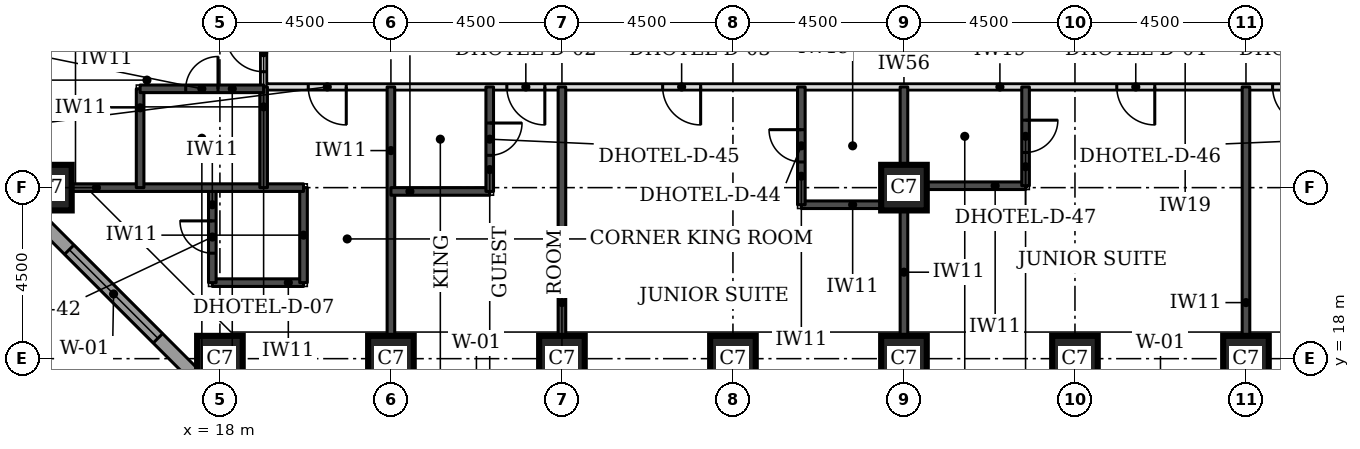
"""IFC4 building model, lengths in metres.
Left out: names, types, materials, properties, quantities, classifications, styles, units other than length and angle.
Written with IfcOpenShell. Run it as: python <this file> out.ifc"""

import sys

from ifc_helpers import new_model, si_unit, direction, frame, frame_2d, origin, origin_2d, place, context, subcontext, project, spatial, rectangle, extrude, element, fill, save


model = new_model("IFC4")
c1 = context("Model", 3, precision=1e-05, world=origin(), true_north=direction((0.0, 1.0)))
c2 = subcontext(c1, "Body", "Model", "MODEL_VIEW")
j1 = project(units=[si_unit("LENGTHUNIT", "METRE"), si_unit("PLANEANGLEUNIT", "RADIAN")], contexts=[c1])
p1 = place(None, origin())
s1 = spatial("IfcSite", under=j1, at=p1, CompositionType="ELEMENT")
p2 = place(p1, origin())
s2 = spatial("IfcBuilding", under=s1, at=p2, CompositionType="ELEMENT")
p3 = place(p2, frame((0.0, 0.0, 36.3)))
s3 = spatial("IfcBuildingStorey", under=s2, at=p3, CompositionType="ELEMENT", Elevation=36.3)
for number, where, z_axis, x_axis in (
    (1, (18.0, 18.0, 0.0), (0.0, 0.0, 1.0), (1.0, 0.0, 0.0)),
    (2, (22.5, 18.0, 0.0), (0.0, 0.0, 1.0), (1.0, 0.0, 0.0)),
    (3, (27.0, 18.0, 0.0), (0.0, 0.0, 1.0), (1.0, 0.0, 0.0)),
    (4, (31.5, 18.0, 0.0), (0.0, 0.0, 1.0), (1.0, 0.0, 0.0)),
    (5, (36.0, 18.0, 0.0), (0.0, 0.0, 1.0), (1.0, 0.0, 0.0)),
    (6, (40.5, 18.0, 0.0), (0.0, 0.0, 1.0), (1.0, 0.0, 0.0)),
    (7, (45.0, 18.0, 0.0), (0.0, 0.0, 1.0), (1.0, 0.0, 0.0)),
    (8, (13.5, 22.5, 0.0), (0.0, 0.0, 1.0), (1.0, 0.0, 0.0)),
    (9, (36.0, 22.5, 0.0), (0.0, 0.0, 1.0), (1.0, 0.0, 0.0)),
):
    element("IfcColumn", number, at=place(p3, frame(where, z_axis=z_axis, x_axis=x_axis)), inside=s3, PredefinedType="COLUMN", context=c2, shape_type="SweptSolid", body=[
        extrude(rectangle(XDim=1.2, YDim=1.2, at=origin_2d()), origin(), (0.0, 0.0, 1.0), 3.3),
    ])
p4 = place(p3, frame((12.674, 22.23, 0.0), z_axis=(0.0, 0.0, 1.0), x_axis=(0.707106781187, -0.707106781187, 0.0)))
e10 = element("IfcWall", 10, at=p4, inside=s3, PredefinedType="STANDARD", context=c2, shape_type="SweptSolid", body=[
    extrude(rectangle(XDim=7.151, YDim=0.35, at=frame_2d((3.576, 0.0))), origin(), (0.0, 0.0, 1.0), 3.055),
])
p5 = place(p4, frame((1.926, 0.0, 0.8)))
e11 = element("IfcOpeningElement", 11, at=p5, cuts=e10, PredefinedType="OPENING", context=c2, shape_type="SweptSolid", body=[
    extrude(rectangle(XDim=3.3, YDim=1.5, at=frame_2d((1.65, 0.75))), frame((0.0, 0.185, 0.0), z_axis=(0.0, -1.0, 0.0), x_axis=(1.0, 0.0, 0.0)), (0.0, 0.0, 1.0), 0.37),
])
p6 = place(p3, frame((19.15, 25.15, 0.0), z_axis=(0.0, 0.0, 1.0), x_axis=(1.0, 0.0, 0.0)))
e12 = element("IfcWall", 12, at=p6, inside=s3, PredefinedType="PARTITIONING", context=c2, shape_type="SweptSolid", body=[
    extrude(rectangle(XDim=32.35, YDim=0.15, at=frame_2d((16.175, 0.0))), origin(), (0.0, 0.0, 1.0), 3.08),
])
p7 = place(p6, frame((6.4, 0.0, 0.0)))
e13 = element("IfcOpeningElement", 13, at=p7, cuts=e12, PredefinedType="OPENING", context=c2, shape_type="SweptSolid", body=[
    extrude(rectangle(XDim=1.0, YDim=2.1, at=frame_2d((0.5, 1.05))), frame((0.0, 0.085, 0.0), z_axis=(0.0, -1.0, 0.0), x_axis=(1.0, 0.0, 0.0)), (0.0, 0.0, 1.0), 0.17),
])
p8 = place(p6, frame((10.5, 0.0, 0.0)))
e14 = element("IfcOpeningElement", 14, at=p8, cuts=e12, PredefinedType="OPENING", context=c2, shape_type="SweptSolid", body=[
    extrude(rectangle(XDim=1.0, YDim=2.1, at=frame_2d((0.5, 1.05))), frame((0.0, 0.085, 0.0), z_axis=(0.0, -1.0, 0.0), x_axis=(1.0, 0.0, 0.0)), (0.0, 0.0, 1.0), 0.17),
])
p9 = place(p6, frame((22.45, 0.0, 0.0)))
e15 = element("IfcOpeningElement", 15, at=p9, cuts=e12, PredefinedType="OPENING", context=c2, shape_type="SweptSolid", body=[
    extrude(rectangle(XDim=1.0, YDim=2.1, at=frame_2d((0.5, 1.05))), frame((0.0, 0.085, 0.0), z_axis=(0.0, -1.0, 0.0), x_axis=(1.0, 0.0, 0.0)), (0.0, 0.0, 1.0), 0.17),
])
p10 = place(p6, frame((26.55, 0.0, 0.0)))
e16 = element("IfcOpeningElement", 16, at=p10, cuts=e12, PredefinedType="OPENING", context=c2, shape_type="SweptSolid", body=[
    extrude(rectangle(XDim=1.0, YDim=2.1, at=frame_2d((0.5, 1.05))), frame((0.0, 0.085, 0.0), z_axis=(0.0, -1.0, 0.0), x_axis=(1.0, 0.0, 0.0)), (0.0, 0.0, 1.0), 0.17),
])
p11 = place(p6, frame((1.175, 0.0, 0.0)))
e17 = element("IfcOpeningElement", 17, at=p11, cuts=e12, PredefinedType="OPENING", context=c2, shape_type="SweptSolid", body=[
    extrude(rectangle(XDim=1.0, YDim=2.1, at=frame_2d((0.5, 1.05))), frame((0.0, 0.085, 0.0), z_axis=(0.0, -1.0, 0.0), x_axis=(1.0, 0.0, 0.0)), (0.0, 0.0, 1.0), 0.17),
])
p12 = place(p6, frame((30.85, 0.0, 0.0)))
e18 = element("IfcOpeningElement", 18, at=p12, cuts=e12, PredefinedType="OPENING", context=c2, shape_type="SweptSolid", body=[
    extrude(rectangle(XDim=1.0, YDim=2.1, at=frame_2d((0.5, 1.05))), frame((0.0, 0.085, 0.0), z_axis=(0.0, -1.0, 0.0), x_axis=(1.0, 0.0, 0.0)), (0.0, 0.0, 1.0), 0.17),
])
p13 = place(p3, frame((19.15, 25.15, 0.0), z_axis=(0.0, 0.0, 1.0), x_axis=(0.0, 1.0, 0.0)))
e19 = element("IfcWall", 19, at=p13, inside=s3, PredefinedType="PARTITIONING", context=c2, shape_type="SweptSolid", body=[
    extrude(rectangle(XDim=24.35, YDim=0.15, at=frame_2d((12.175, 0.0))), origin(), (0.0, 0.0, 1.0), 3.08),
])
p14 = place(p13, frame((0.4, 0.0, 0.0)))
e20 = element("IfcOpeningElement", 20, at=p14, cuts=e19, PredefinedType="OPENING", context=c2, shape_type="SweptSolid", body=[
    extrude(rectangle(XDim=1.0, YDim=2.1, at=frame_2d((0.5, 1.05))), frame((0.0, 0.085, 0.0), z_axis=(0.0, -1.0, 0.0), x_axis=(1.0, 0.0, 0.0)), (0.0, 0.0, 1.0), 0.17),
])
p15 = place(p13, frame((2.55, 0.0, 0.0)))
e21 = element("IfcOpeningElement", 21, at=p15, cuts=e19, PredefinedType="OPENING", context=c2, shape_type="SweptSolid", body=[
    extrude(rectangle(XDim=1.0, YDim=2.1, at=frame_2d((0.5, 1.05))), frame((0.0, 0.085, 0.0), z_axis=(0.0, -1.0, 0.0), x_axis=(1.0, 0.0, 0.0)), (0.0, 0.0, 1.0), 0.17),
])
p16 = place(p13, frame((9.4, 0.0, 0.0)))
e22 = element("IfcOpeningElement", 22, at=p16, cuts=e19, PredefinedType="OPENING", context=c2, shape_type="SweptSolid", body=[
    extrude(rectangle(XDim=1.0, YDim=2.1, at=frame_2d((0.5, 1.05))), frame((0.0, 0.085, 0.0), z_axis=(0.0, -1.0, 0.0), x_axis=(1.0, 0.0, 0.0)), (0.0, 0.0, 1.0), 0.17),
])
p17 = place(p13, frame((11.55, 0.0, 0.0)))
e23 = element("IfcOpeningElement", 23, at=p17, cuts=e19, PredefinedType="OPENING", context=c2, shape_type="SweptSolid", body=[
    extrude(rectangle(XDim=1.0, YDim=2.1, at=frame_2d((0.5, 1.05))), frame((0.0, 0.085, 0.0), z_axis=(0.0, -1.0, 0.0), x_axis=(1.0, 0.0, 0.0)), (0.0, 0.0, 1.0), 0.17),
])
p18 = place(p13, frame((18.4, 0.0, 0.0)))
e24 = element("IfcOpeningElement", 24, at=p18, cuts=e19, PredefinedType="OPENING", context=c2, shape_type="SweptSolid", body=[
    extrude(rectangle(XDim=1.0, YDim=2.1, at=frame_2d((0.5, 1.05))), frame((0.0, 0.085, 0.0), z_axis=(0.0, -1.0, 0.0), x_axis=(1.0, 0.0, 0.0)), (0.0, 0.0, 1.0), 0.17),
])
p19 = place(p13, frame((20.55, 0.0, 0.0)))
e25 = element("IfcOpeningElement", 25, at=p19, cuts=e19, PredefinedType="OPENING", context=c2, shape_type="SweptSolid", body=[
    extrude(rectangle(XDim=1.0, YDim=2.1, at=frame_2d((0.5, 1.05))), frame((0.0, 0.085, 0.0), z_axis=(0.0, -1.0, 0.0), x_axis=(1.0, 0.0, 0.0)), (0.0, 0.0, 1.0), 0.17),
])
for number, where, z_axis, x_axis in (
    (26, (22.5, 18.6, 0.0), (0.0, 0.0, 1.0), (0.0, 1.0, 0.0)),
    (27, (27.0, 18.6, 0.0), (0.0, 0.0, 1.0), (0.0, 1.0, 0.0)),
    (28, (36.0, 18.6, 0.0), (0.0, 0.0, 1.0), (0.0, 1.0, 0.0)),
    (29, (45.0, 18.6, 0.0), (0.0, 0.0, 1.0), (0.0, 1.0, 0.0)),
):
    element("IfcWall", number, at=place(p3, frame(where, z_axis=z_axis, x_axis=x_axis)), inside=s3, PredefinedType="SOLIDWALL", context=c2, shape_type="SweptSolid", body=[
        extrude(rectangle(XDim=6.55, YDim=0.2, at=frame_2d((3.275, 0.0))), origin(), (0.0, 0.0, 1.0), 3.08),
    ])
p20 = place(p3, frame((17.8, 20.0, 0.0), z_axis=(0.0, 0.0, 1.0), x_axis=(1.0, 0.0, 0.0)))
e30 = element("IfcWall", 30, at=p20, inside=s3, PredefinedType="SOLIDWALL", context=c2, shape_type="SweptSolid", body=[
    extrude(rectangle(XDim=2.4, YDim=0.2, at=frame_2d((1.2, 0.0))), origin(), (0.0, 0.0, 1.0), 3.08),
])
p21 = place(p3, frame((17.8, 20.0, 0.0), z_axis=(0.0, 0.0, 1.0), x_axis=(0.0, 1.0, 0.0)))
e31 = element("IfcWall", 31, at=p21, inside=s3, PredefinedType="SOLIDWALL", context=c2, shape_type="SweptSolid", body=[
    extrude(rectangle(XDim=2.5, YDim=0.2, at=frame_2d((1.25, 0.0))), origin(), (0.0, 0.0, 1.0), 3.08),
])
p22 = place(p21, frame((0.775, 0.0, 0.0)))
e32 = element("IfcOpeningElement", 32, at=p22, cuts=e31, PredefinedType="OPENING", context=c2, shape_type="SweptSolid", body=[
    extrude(rectangle(XDim=0.85, YDim=2.1, at=frame_2d((0.425, 1.05))), frame((0.0, 0.11, 0.0), z_axis=(0.0, -1.0, 0.0), x_axis=(1.0, 0.0, 0.0)), (0.0, 0.0, 1.0), 0.22),
])
p23 = place(p3, frame((20.2, 20.0, 0.0), z_axis=(0.0, 0.0, 1.0), x_axis=(0.0, 1.0, 0.0)))
e33 = element("IfcWall", 33, at=p23, inside=s3, PredefinedType="SOLIDWALL", context=c2, shape_type="SweptSolid", body=[
    extrude(rectangle(XDim=2.5, YDim=0.2, at=frame_2d((1.25, 0.0))), origin(), (0.0, 0.0, 1.0), 3.08),
])
p24 = place(p3, frame((33.3, 22.05, 0.0), z_axis=(0.0, 0.0, 1.0), x_axis=(1.0, 0.0, 0.0)))
e34 = element("IfcWall", 34, at=p24, inside=s3, PredefinedType="SOLIDWALL", context=c2, shape_type="SweptSolid", body=[
    extrude(rectangle(XDim=2.7, YDim=0.2, at=frame_2d((1.35, 0.0))), origin(), (0.0, 0.0, 1.0), 3.08),
])
p25 = place(p3, frame((33.3, 22.05, 0.0), z_axis=(0.0, 0.0, 1.0), x_axis=(0.0, 1.0, 0.0)))
e35 = element("IfcWall", 35, at=p25, inside=s3, PredefinedType="SOLIDWALL", context=c2, shape_type="SweptSolid", body=[
    extrude(rectangle(XDim=3.1, YDim=0.2, at=frame_2d((1.55, 0.0))), origin(), (0.0, 0.0, 1.0), 3.08),
])
p26 = place(p25, frame((1.125, 0.0, 0.0)))
e36 = element("IfcOpeningElement", 36, at=p26, cuts=e35, PredefinedType="OPENING", context=c2, shape_type="SweptSolid", body=[
    extrude(rectangle(XDim=0.85, YDim=2.1, at=frame_2d((0.425, 1.05))), frame((0.0, 0.11, 0.0), z_axis=(0.0, -1.0, 0.0), x_axis=(1.0, 0.0, 0.0)), (0.0, 0.0, 1.0), 0.22),
])
p27 = place(p3, frame((22.5, 22.4, 0.0), z_axis=(0.0, 0.0, 1.0), x_axis=(1.0, 0.0, 0.0)))
e37 = element("IfcWall", 37, at=p27, inside=s3, PredefinedType="SOLIDWALL", context=c2, shape_type="SweptSolid", body=[
    extrude(rectangle(XDim=2.6, YDim=0.2, at=frame_2d((1.3, 0.0))), origin(), (0.0, 0.0, 1.0), 3.08),
])
p28 = place(p3, frame((25.1, 22.4, 0.0), z_axis=(0.0, 0.0, 1.0), x_axis=(0.0, 1.0, 0.0)))
e38 = element("IfcWall", 38, at=p28, inside=s3, PredefinedType="SOLIDWALL", context=c2, shape_type="SweptSolid", body=[
    extrude(rectangle(XDim=2.75, YDim=0.2, at=frame_2d((1.375, 0.0))), origin(), (0.0, 0.0, 1.0), 3.08),
])
p29 = place(p28, frame((0.95, 0.0, 0.0)))
e39 = element("IfcOpeningElement", 39, at=p29, cuts=e38, PredefinedType="OPENING", context=c2, shape_type="SweptSolid", body=[
    extrude(rectangle(XDim=0.85, YDim=2.1, at=frame_2d((0.425, 1.05))), frame((0.0, 0.11, 0.0), z_axis=(0.0, -1.0, 0.0), x_axis=(1.0, 0.0, 0.0)), (0.0, 0.0, 1.0), 0.22),
])
p30 = place(p3, frame((14.1, 22.5, 0.0), z_axis=(0.0, 0.0, 1.0), x_axis=(1.0, 0.0, 0.0)))
e40 = element("IfcWall", 40, at=p30, inside=s3, PredefinedType="SOLIDWALL", context=c2, shape_type="SweptSolid", body=[
    extrude(rectangle(XDim=6.1, YDim=0.2, at=frame_2d((3.05, 0.0))), origin(), (0.0, 0.0, 1.0), 3.08),
])
p31 = place(p3, frame((15.9, 22.5, 0.0), z_axis=(0.0, 0.0, 1.0), x_axis=(0.0, 1.0, 0.0)))
e41 = element("IfcWall", 41, at=p31, inside=s3, PredefinedType="SOLIDWALL", context=c2, shape_type="SweptSolid", body=[
    extrude(rectangle(XDim=2.6, YDim=0.2, at=frame_2d((1.3, 0.0))), origin(), (0.0, 0.0, 1.0), 3.08),
])
p32 = place(p3, frame((19.15, 22.5, 0.0), z_axis=(0.0, 0.0, 1.0), x_axis=(0.0, 1.0, 0.0)))
e42 = element("IfcWall", 42, at=p32, inside=s3, PredefinedType="SOLIDWALL", context=c2, shape_type="SweptSolid", body=[
    extrude(rectangle(XDim=2.65, YDim=0.2, at=frame_2d((1.325, 0.0))), origin(), (0.0, 0.0, 1.0), 3.08),
])
p33 = place(p3, frame((36.0, 22.55, 0.0), z_axis=(0.0, 0.0, 1.0), x_axis=(1.0, 0.0, 0.0)))
e43 = element("IfcWall", 43, at=p33, inside=s3, PredefinedType="SOLIDWALL", context=c2, shape_type="SweptSolid", body=[
    extrude(rectangle(XDim=3.2, YDim=0.2, at=frame_2d((1.6, 0.0))), origin(), (0.0, 0.0, 1.0), 3.08),
])
p34 = place(p3, frame((39.2, 22.55, 0.0), z_axis=(0.0, 0.0, 1.0), x_axis=(0.0, 1.0, 0.0)))
e44 = element("IfcWall", 44, at=p34, inside=s3, PredefinedType="SOLIDWALL", context=c2, shape_type="SweptSolid", body=[
    extrude(rectangle(XDim=2.6, YDim=0.2, at=frame_2d((1.3, 0.0))), origin(), (0.0, 0.0, 1.0), 3.08),
])
p35 = place(p34, frame((0.875, 0.0, 0.0)))
e45 = element("IfcOpeningElement", 45, at=p35, cuts=e44, PredefinedType="OPENING", context=c2, shape_type="SweptSolid", body=[
    extrude(rectangle(XDim=0.85, YDim=2.1, at=frame_2d((0.425, 1.05))), frame((0.0, 0.11, 0.0), z_axis=(0.0, -1.0, 0.0), x_axis=(1.0, 0.0, 0.0)), (0.0, 0.0, 1.0), 0.22),
])
p36 = place(p3, frame((15.9, 25.1, 0.0), z_axis=(0.0, 0.0, 1.0), x_axis=(1.0, 0.0, 0.0)))
e46 = element("IfcWall", 46, at=p36, inside=s3, PredefinedType="SOLIDWALL", context=c2, shape_type="SweptSolid", body=[
    extrude(rectangle(XDim=3.25, YDim=0.2, at=frame_2d((1.625, 0.0))), origin(), (0.0, 0.0, 1.0), 3.08),
])
p37 = place(p36, frame((1.2, 0.0, 0.0)))
e47 = element("IfcOpeningElement", 47, at=p37, cuts=e46, PredefinedType="OPENING", context=c2, shape_type="SweptSolid", body=[
    extrude(rectangle(XDim=0.85, YDim=2.1, at=frame_2d((0.425, 1.05))), frame((0.0, 0.11, 0.0), z_axis=(0.0, -1.0, 0.0), x_axis=(1.0, 0.0, 0.0)), (0.0, 0.0, 1.0), 0.22),
])
p38 = place(p5, origin())
e48 = element("IfcWindow", 48, at=p38, inside=s3, PartitioningType="SINGLE_PANEL", PredefinedType="WINDOW", context=c2, shape_type="SweptSolid", body=[
    extrude(rectangle(XDim=3.3, YDim=1.5, at=frame_2d((1.65, 0.75))), frame((0.0, 0.085, 0.0), z_axis=(0.0, -1.0, 0.0), x_axis=(1.0, 0.0, 0.0)), (0.0, 0.0, 1.0), 0.06),
])
fill(e11, e48)
p39 = place(p7, frame((1.0, 0.0, 0.0), z_axis=(0.0, 0.0, 1.0), x_axis=(-1.0, 0.0, 0.0)))
e49 = element("IfcDoor", 49, at=p39, inside=s3, OperationType="SINGLE_SWING_LEFT", PredefinedType="DOOR", context=c2, shape_type="SweptSolid", body=[
    extrude(rectangle(XDim=1.0, YDim=2.1, at=frame_2d((0.5, 1.05))), frame((0.0, 0.025, 0.0), z_axis=(0.0, -1.0, 0.0), x_axis=(1.0, 0.0, 0.0)), (0.0, 0.0, 1.0), 0.05),
])
fill(e13, e49)
p40 = place(p29, frame((0.85, 0.0, 0.0), z_axis=(0.0, 0.0, 1.0), x_axis=(-1.0, 0.0, 0.0)))
e50 = element("IfcDoor", 50, at=p40, inside=s3, OperationType="SINGLE_SWING_LEFT", PredefinedType="DOOR", context=c2, shape_type="SweptSolid", body=[
    extrude(rectangle(XDim=0.85, YDim=2.1, at=frame_2d((0.425, 1.05))), frame((0.0, 0.025, 0.0), z_axis=(0.0, -1.0, 0.0), x_axis=(1.0, 0.0, 0.0)), (0.0, 0.0, 1.0), 0.05),
])
fill(e39, e50)
p41 = place(p8, frame((1.0, 0.0, 0.0), z_axis=(0.0, 0.0, 1.0), x_axis=(-1.0, 0.0, 0.0)))
e51 = element("IfcDoor", 51, at=p41, inside=s3, OperationType="SINGLE_SWING_LEFT", PredefinedType="DOOR", context=c2, shape_type="SweptSolid", body=[
    extrude(rectangle(XDim=1.0, YDim=2.1, at=frame_2d((0.5, 1.05))), frame((0.0, 0.025, 0.0), z_axis=(0.0, -1.0, 0.0), x_axis=(1.0, 0.0, 0.0)), (0.0, 0.0, 1.0), 0.05),
])
fill(e14, e51)
p42 = place(p26, origin())
e52 = element("IfcDoor", 52, at=p42, inside=s3, OperationType="SINGLE_SWING_RIGHT", PredefinedType="DOOR", context=c2, shape_type="SweptSolid", body=[
    extrude(rectangle(XDim=0.85, YDim=2.1, at=frame_2d((0.425, 1.05))), frame((0.0, 0.025, 0.0), z_axis=(0.0, -1.0, 0.0), x_axis=(1.0, 0.0, 0.0)), (0.0, 0.0, 1.0), 0.05),
])
fill(e36, e52)
p43 = place(p9, frame((1.0, 0.0, 0.0), z_axis=(0.0, 0.0, 1.0), x_axis=(-1.0, 0.0, 0.0)))
e53 = element("IfcDoor", 53, at=p43, inside=s3, OperationType="SINGLE_SWING_LEFT", PredefinedType="DOOR", context=c2, shape_type="SweptSolid", body=[
    extrude(rectangle(XDim=1.0, YDim=2.1, at=frame_2d((0.5, 1.05))), frame((0.0, 0.025, 0.0), z_axis=(0.0, -1.0, 0.0), x_axis=(1.0, 0.0, 0.0)), (0.0, 0.0, 1.0), 0.05),
])
fill(e15, e53)
p44 = place(p35, frame((0.85, 0.0, 0.0), z_axis=(0.0, 0.0, 1.0), x_axis=(-1.0, 0.0, 0.0)))
e54 = element("IfcDoor", 54, at=p44, inside=s3, OperationType="SINGLE_SWING_LEFT", PredefinedType="DOOR", context=c2, shape_type="SweptSolid", body=[
    extrude(rectangle(XDim=0.85, YDim=2.1, at=frame_2d((0.425, 1.05))), frame((0.0, 0.025, 0.0), z_axis=(0.0, -1.0, 0.0), x_axis=(1.0, 0.0, 0.0)), (0.0, 0.0, 1.0), 0.05),
])
fill(e45, e54)
p45 = place(p10, frame((1.0, 0.0, 0.0), z_axis=(0.0, 0.0, 1.0), x_axis=(-1.0, 0.0, 0.0)))
e55 = element("IfcDoor", 55, at=p45, inside=s3, OperationType="SINGLE_SWING_LEFT", PredefinedType="DOOR", context=c2, shape_type="SweptSolid", body=[
    extrude(rectangle(XDim=1.0, YDim=2.1, at=frame_2d((0.5, 1.05))), frame((0.0, 0.025, 0.0), z_axis=(0.0, -1.0, 0.0), x_axis=(1.0, 0.0, 0.0)), (0.0, 0.0, 1.0), 0.05),
])
fill(e16, e55)
p46 = place(p14, origin())
e56 = element("IfcDoor", 56, at=p46, inside=s3, OperationType="SINGLE_SWING_RIGHT", PredefinedType="DOOR", context=c2, shape_type="SweptSolid", body=[
    extrude(rectangle(XDim=1.0, YDim=2.1, at=frame_2d((0.5, 1.05))), frame((0.0, 0.025, 0.0), z_axis=(0.0, -1.0, 0.0), x_axis=(1.0, 0.0, 0.0)), (0.0, 0.0, 1.0), 0.05),
])
fill(e20, e56)
p47 = place(p37, origin())
e57 = element("IfcDoor", 57, at=p47, inside=s3, OperationType="SINGLE_SWING_RIGHT", PredefinedType="DOOR", context=c2, shape_type="SweptSolid", body=[
    extrude(rectangle(XDim=0.85, YDim=2.1, at=frame_2d((0.425, 1.05))), frame((0.0, 0.025, 0.0), z_axis=(0.0, -1.0, 0.0), x_axis=(1.0, 0.0, 0.0)), (0.0, 0.0, 1.0), 0.05),
])
fill(e47, e57)
p48 = place(p11, frame((1.0, 0.0, 0.0), z_axis=(0.0, 0.0, 1.0), x_axis=(-1.0, 0.0, 0.0)))
e58 = element("IfcDoor", 58, at=p48, inside=s3, OperationType="SINGLE_SWING_LEFT", PredefinedType="DOOR", context=c2, shape_type="SweptSolid", body=[
    extrude(rectangle(XDim=1.0, YDim=2.1, at=frame_2d((0.5, 1.05))), frame((0.0, 0.025, 0.0), z_axis=(0.0, -1.0, 0.0), x_axis=(1.0, 0.0, 0.0)), (0.0, 0.0, 1.0), 0.05),
])
fill(e17, e58)
p49 = place(p22, origin())
e59 = element("IfcDoor", 59, at=p49, inside=s3, OperationType="SINGLE_SWING_RIGHT", PredefinedType="DOOR", context=c2, shape_type="SweptSolid", body=[
    extrude(rectangle(XDim=0.85, YDim=2.1, at=frame_2d((0.425, 1.05))), frame((0.0, 0.025, 0.0), z_axis=(0.0, -1.0, 0.0), x_axis=(1.0, 0.0, 0.0)), (0.0, 0.0, 1.0), 0.05),
])
fill(e32, e59)
save(model, sys.argv[1])
